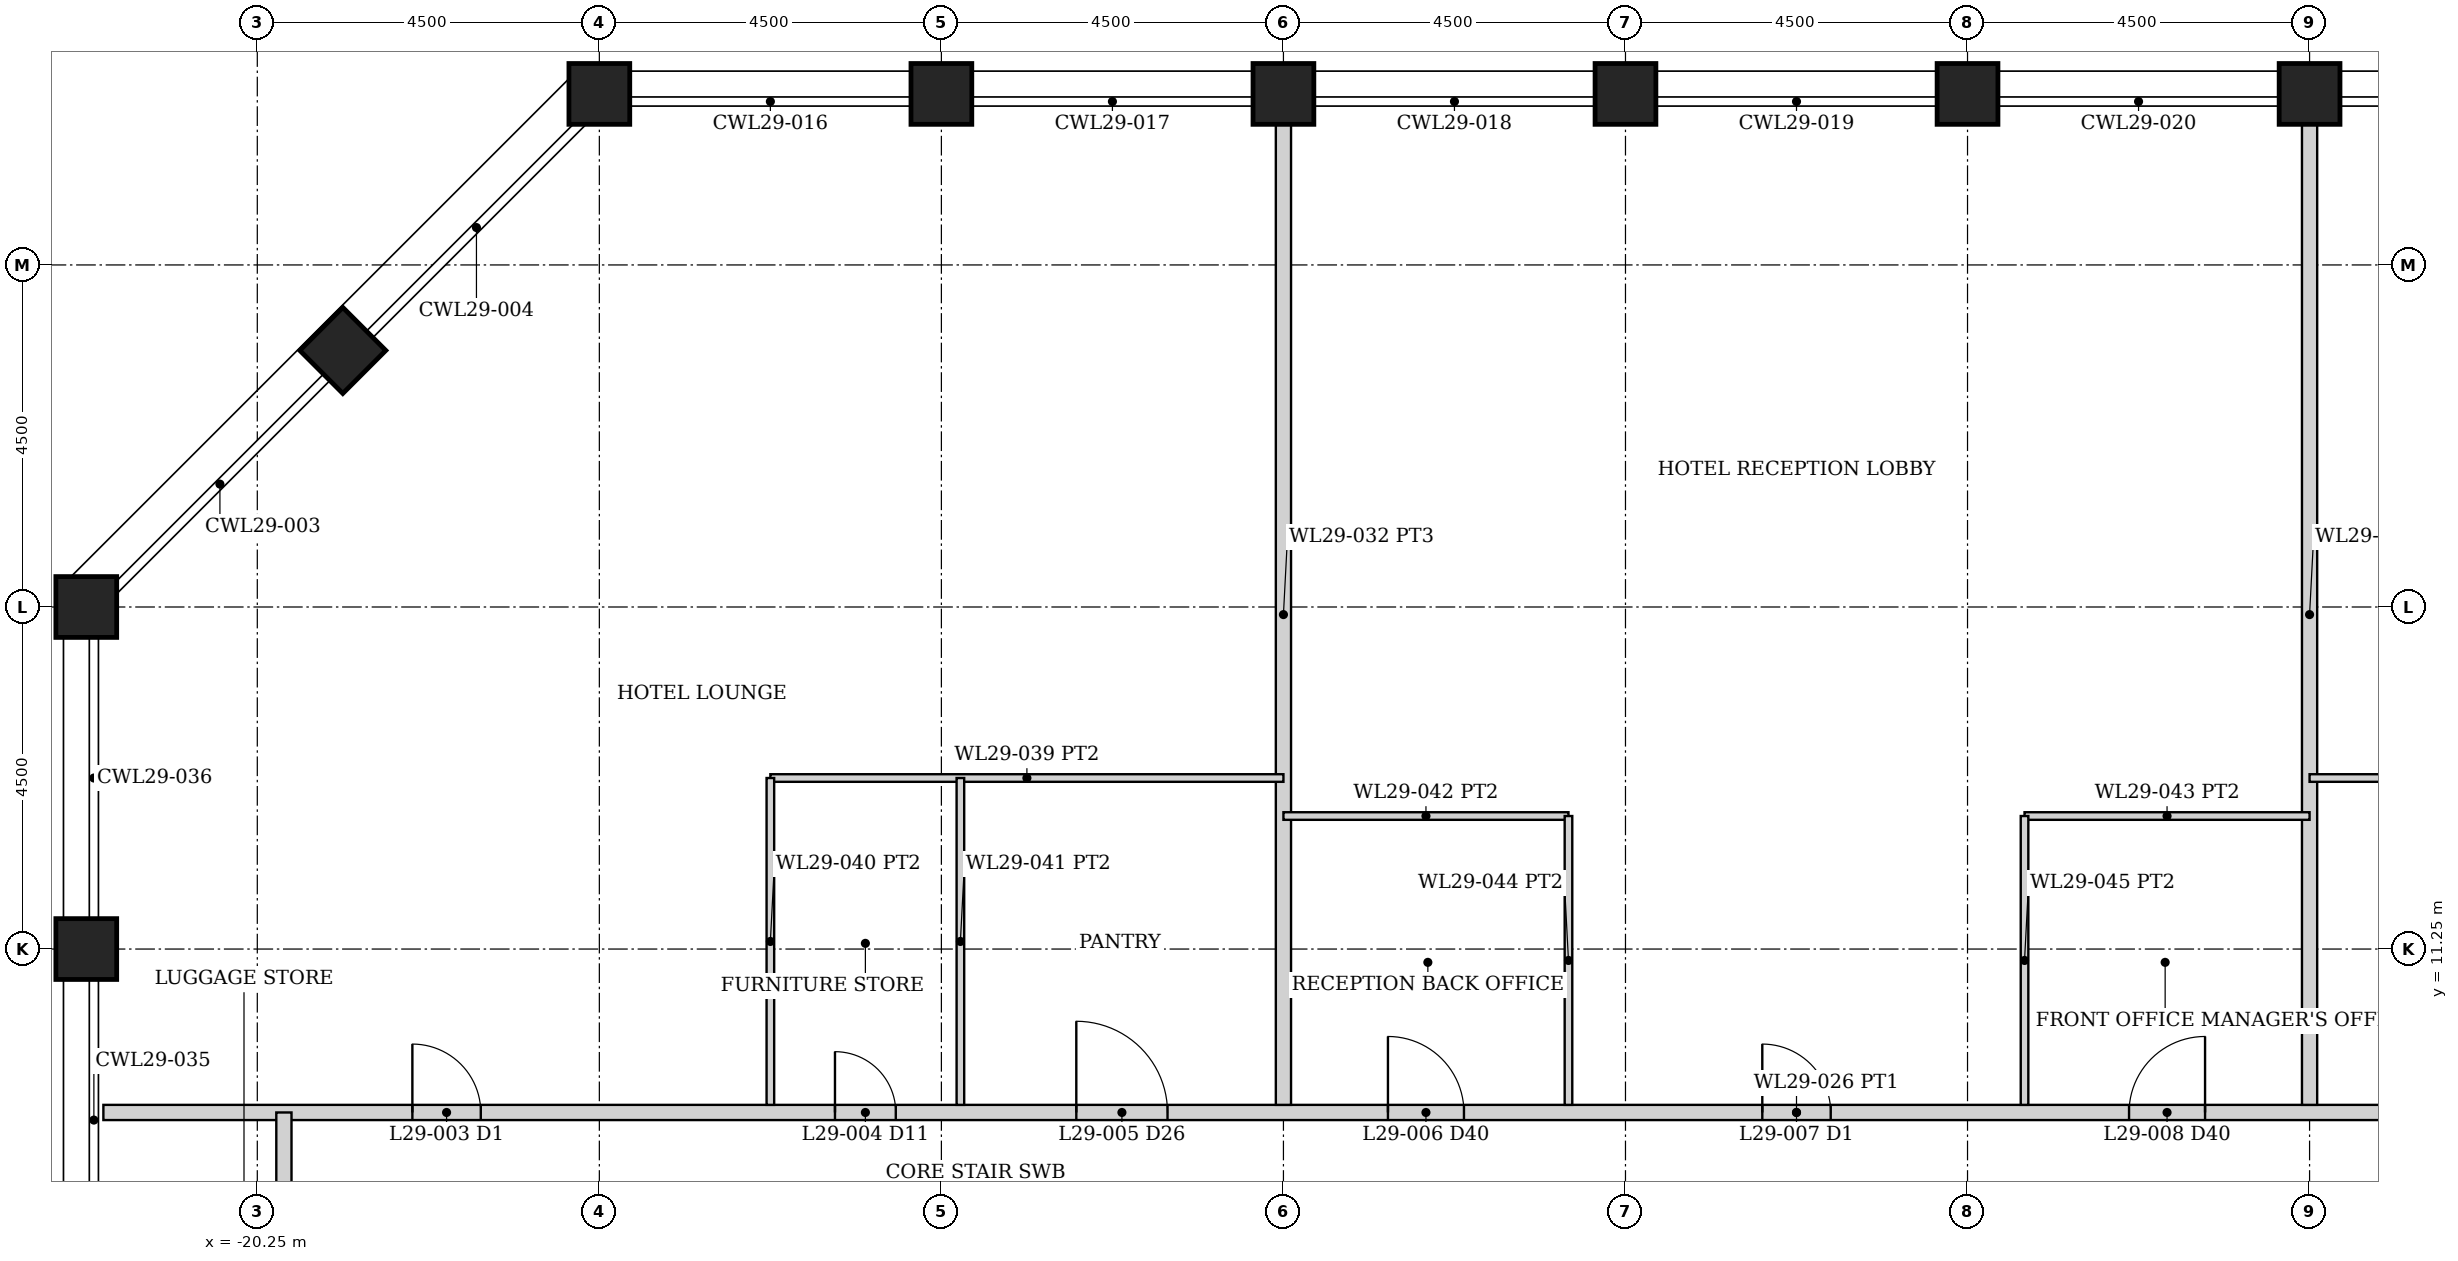
"""IFC4 building model, lengths in metres.
Left out: names, types, materials, properties, quantities, classifications, styles, units other than length and angle.
Written with IfcOpenShell. Run it as: python <this file> out.ifc"""

import sys

from ifc_helpers import new_model, si_unit, direction, frame, frame_2d, origin, origin_2d, place, context, subcontext, project, spatial, rectangle, hollow_rectangle, extrude, element, fill, save


model = new_model("IFC4")
c1 = context("Model", 3, precision=1e-05, world=origin(), true_north=direction((0.0, 1.0)))
c2 = subcontext(c1, "Body", "Model", "MODEL_VIEW")
j1 = project(units=[si_unit("LENGTHUNIT", "METRE"), si_unit("PLANEANGLEUNIT", "RADIAN")], contexts=[c1])
p1 = place(None, origin())
s1 = spatial("IfcSite", under=j1, at=p1, CompositionType="ELEMENT")
p2 = place(p1, origin())
s2 = spatial("IfcBuilding", under=s1, at=p2, CompositionType="ELEMENT")
p3 = place(p2, frame((0.0, 0.0, 112.4)))
s3 = spatial("IfcBuildingStorey", under=s2, at=p3, CompositionType="ELEMENT", Elevation=112.4)
for number, where, z_axis, x_axis in (
    (1, (-15.75, 22.5, 0.0), (0.0, 0.0, 1.0), (0.0, 1.0, 0.0)),
    (2, (-11.25, 22.5, 0.0), (0.0, 0.0, 1.0), (0.0, 1.0, 0.0)),
    (3, (-6.75, 22.5, 0.0), (0.0, 0.0, 1.0), (0.0, 1.0, 0.0)),
    (4, (-2.25, 22.5, 0.0), (0.0, 0.0, 1.0), (0.0, 1.0, 0.0)),
    (5, (2.25, 22.5, 0.0), (0.0, 0.0, 1.0), (0.0, 1.0, 0.0)),
    (6, (6.75, 22.5, 0.0), (0.0, 0.0, 1.0), (0.0, 1.0, 0.0)),
    (7, (-22.5, 11.25, 0.0), (0.0, 0.0, 1.0), (1.0, 0.0, 0.0)),
    (8, (-22.5, 15.75, 0.0), (0.0, 0.0, 1.0), (1.0, 0.0, 0.0)),
    (9, (-19.125, 19.125, 0.0), (0.0, 0.0, 1.0), (0.707, -0.707, 0.0)),
):
    element("IfcColumn", number, at=place(p3, frame(where, z_axis=z_axis, x_axis=x_axis)), inside=s3, PredefinedType="COLUMN", context=c2, shape_type="SweptSolid", body=[
        extrude(hollow_rectangle(XDim=0.8, YDim=0.8, WallThickness=0.06, at=origin_2d()), origin(), (0.0, 0.0, 1.0), 6.0),
    ])
p4 = place(p3, frame((-22.275, 9.1, 0.0), z_axis=(0.0, 0.0, 1.0), x_axis=(1.0, 0.0, 0.0)))
e10 = element("IfcWall", 10, at=p4, inside=s3, PredefinedType="PARTITIONING", context=c2, shape_type="SweptSolid", body=[
    extrude(rectangle(XDim=44.55, YDim=0.2, at=frame_2d((22.275, 0.0))), origin(), (0.0, 0.0, 1.0), 4.874),
])
p5 = place(p4, frame((4.065, 0.0, 0.0)))
e11 = element("IfcOpeningElement", 11, at=p5, cuts=e10, PredefinedType="OPENING", context=c2, shape_type="SweptSolid", body=[
    extrude(rectangle(XDim=0.9, YDim=2.1, at=frame_2d((0.45, 1.05))), frame((0.0, 0.11, 0.0), z_axis=(0.0, -1.0, 0.0), x_axis=(1.0, 0.0, 0.0)), (0.0, 0.0, 1.0), 0.22),
])
p6 = place(p4, frame((9.625, 0.0, 0.0)))
e12 = element("IfcOpeningElement", 12, at=p6, cuts=e10, PredefinedType="OPENING", context=c2, shape_type="SweptSolid", body=[
    extrude(rectangle(XDim=0.8, YDim=2.1, at=frame_2d((0.4, 1.05))), frame((0.0, 0.11, 0.0), z_axis=(0.0, -1.0, 0.0), x_axis=(1.0, 0.0, 0.0)), (0.0, 0.0, 1.0), 0.22),
])
p7 = place(p4, frame((12.8, 0.0, 0.0)))
e13 = element("IfcOpeningElement", 13, at=p7, cuts=e10, PredefinedType="OPENING", context=c2, shape_type="SweptSolid", body=[
    extrude(rectangle(XDim=1.2, YDim=2.1, at=frame_2d((0.6, 1.05))), frame((0.0, 0.11, 0.0), z_axis=(0.0, -1.0, 0.0), x_axis=(1.0, 0.0, 0.0)), (0.0, 0.0, 1.0), 0.22),
])
p8 = place(p4, frame((21.825, 0.0, 0.0)))
e14 = element("IfcOpeningElement", 14, at=p8, cuts=e10, PredefinedType="OPENING", context=c2, shape_type="SweptSolid", body=[
    extrude(rectangle(XDim=0.9, YDim=2.1, at=frame_2d((0.45, 1.05))), frame((0.0, 0.11, 0.0), z_axis=(0.0, -1.0, 0.0), x_axis=(1.0, 0.0, 0.0)), (0.0, 0.0, 1.0), 0.22),
])
p9 = place(p4, frame((16.9, 0.0, 0.0)))
e15 = element("IfcOpeningElement", 15, at=p9, cuts=e10, PredefinedType="OPENING", context=c2, shape_type="SweptSolid", body=[
    extrude(rectangle(XDim=1.0, YDim=2.1, at=frame_2d((0.5, 1.05))), frame((0.0, 0.11, 0.0), z_axis=(0.0, -1.0, 0.0), x_axis=(1.0, 0.0, 0.0)), (0.0, 0.0, 1.0), 0.22),
])
p10 = place(p4, frame((26.65, 0.0, 0.0)))
e16 = element("IfcOpeningElement", 16, at=p10, cuts=e10, PredefinedType="OPENING", context=c2, shape_type="SweptSolid", body=[
    extrude(rectangle(XDim=1.0, YDim=2.1, at=frame_2d((0.5, 1.05))), frame((0.0, 0.11, 0.0), z_axis=(0.0, -1.0, 0.0), x_axis=(1.0, 0.0, 0.0)), (0.0, 0.0, 1.0), 0.22),
])
p11 = place(p4, frame((40.436, 0.0, 0.0)))
e17 = element("IfcOpeningElement", 17, at=p11, cuts=e10, PredefinedType="OPENING", context=c2, shape_type="SweptSolid", body=[
    extrude(rectangle(XDim=0.9, YDim=2.1, at=frame_2d((0.45, 1.05))), frame((0.0, 0.11, 0.0), z_axis=(0.0, -1.0, 0.0), x_axis=(1.0, 0.0, 0.0)), (0.0, 0.0, 1.0), 0.22),
])
p12 = place(p4, frame((32.15, 0.0, 0.0)))
e18 = element("IfcOpeningElement", 18, at=p12, cuts=e10, PredefinedType="OPENING", context=c2, shape_type="SweptSolid", body=[
    extrude(rectangle(XDim=1.5, YDim=2.1, at=frame_2d((0.75, 1.05))), frame((0.0, 0.11, 0.0), z_axis=(0.0, -1.0, 0.0), x_axis=(1.0, 0.0, 0.0)), (0.0, 0.0, 1.0), 0.22),
])
p13 = place(p4, frame((37.775, 0.0, 0.0)))
e19 = element("IfcOpeningElement", 19, at=p13, cuts=e10, PredefinedType="OPENING", context=c2, shape_type="SweptSolid", body=[
    extrude(rectangle(XDim=1.0, YDim=2.1, at=frame_2d((0.5, 1.05))), frame((0.0, 0.11, 0.0), z_axis=(0.0, -1.0, 0.0), x_axis=(1.0, 0.0, 0.0)), (0.0, 0.0, 1.0), 0.22),
])
p14 = place(p3, frame((-19.9, -9.1, 0.0), z_axis=(0.0, 0.0, 1.0), x_axis=(0.0, 1.0, 0.0)))
e20 = element("IfcWall", 20, at=p14, inside=s3, PredefinedType="PARTITIONING", context=c2, shape_type="SweptSolid", body=[
    extrude(rectangle(XDim=18.2, YDim=0.2, at=frame_2d((9.1, 0.0))), origin(), (0.0, 0.0, 1.0), 4.874),
])
p15 = place(p14, frame((13.95, 0.0, 0.0)))
e21 = element("IfcOpeningElement", 21, at=p15, cuts=e20, PredefinedType="OPENING", context=c2, shape_type="SweptSolid", body=[
    extrude(rectangle(XDim=1.5, YDim=2.4, at=frame_2d((0.75, 1.2))), frame((0.0, 0.11, 0.0), z_axis=(0.0, -1.0, 0.0), x_axis=(1.0, 0.0, 0.0)), (0.0, 0.0, 1.0), 0.22),
])
p16 = place(p14, frame((5.25, 0.0, 0.0)))
e22 = element("IfcOpeningElement", 22, at=p16, cuts=e20, PredefinedType="OPENING", context=c2, shape_type="SweptSolid", body=[
    extrude(rectangle(XDim=0.9, YDim=2.1, at=frame_2d((0.45, 1.05))), frame((0.0, 0.11, 0.0), z_axis=(0.0, -1.0, 0.0), x_axis=(1.0, 0.0, 0.0)), (0.0, 0.0, 1.0), 0.22),
])
for number, where, z_axis, x_axis in (
    (23, (-6.75, 9.2, 0.0), (0.0, 0.0, 1.0), (0.0, 1.0, 0.0)),
    (24, (6.75, 9.2, 0.0), (0.0, 0.0, 1.0), (0.0, 1.0, 0.0)),
):
    element("IfcWall", number, at=place(p3, frame(where, z_axis=z_axis, x_axis=x_axis)), inside=s3, PredefinedType="PARTITIONING", context=c2, shape_type="SweptSolid", body=[
        extrude(rectangle(XDim=12.9, YDim=0.2, at=frame_2d((6.45, 0.0))), origin(), (0.0, 0.0, 1.0), 4.874),
    ])
p17 = place(p3, frame((-13.5, 13.5, 0.0), z_axis=(0.0, 0.0, 1.0), x_axis=(1.0, 0.0, 0.0)))
e25 = element("IfcWall", 25, at=p17, inside=s3, PredefinedType="PARTITIONING", context=c2, shape_type="SweptSolid", body=[
    extrude(rectangle(XDim=6.75, YDim=0.1, at=frame_2d((3.375, 0.0))), origin(), (0.0, 0.0, 1.0), 4.874),
])
for number, where, z_axis, x_axis in (
    (26, (-13.5, 9.2, 0.0), (0.0, 0.0, 1.0), (0.0, 1.0, 0.0)),
    (27, (-11.0, 9.2, 0.0), (0.0, 0.0, 1.0), (0.0, 1.0, 0.0)),
):
    element("IfcWall", number, at=place(p3, frame(where, z_axis=z_axis, x_axis=x_axis)), inside=s3, PredefinedType="PARTITIONING", context=c2, shape_type="SweptSolid", body=[
        extrude(rectangle(XDim=4.3, YDim=0.1, at=frame_2d((2.15, 0.0))), origin(), (0.0, 0.0, 1.0), 4.874),
    ])
for number, where, z_axis, x_axis in (
    (28, (-6.75, 13.0, 0.0), (0.0, 0.0, 1.0), (1.0, 0.0, 0.0)),
    (29, (3.0, 13.0, 0.0), (0.0, 0.0, 1.0), (1.0, 0.0, 0.0)),
):
    element("IfcWall", number, at=place(p3, frame(where, z_axis=z_axis, x_axis=x_axis)), inside=s3, PredefinedType="PARTITIONING", context=c2, shape_type="SweptSolid", body=[
        extrude(rectangle(XDim=3.75, YDim=0.1, at=frame_2d((1.875, 0.0))), origin(), (0.0, 0.0, 1.0), 4.874),
    ])
for number, where, z_axis, x_axis in (
    (30, (-3.0, 9.2, 0.0), (0.0, 0.0, 1.0), (0.0, 1.0, 0.0)),
    (31, (3.0, 9.2, 0.0), (0.0, 0.0, 1.0), (0.0, 1.0, 0.0)),
):
    element("IfcWall", number, at=place(p3, frame(where, z_axis=z_axis, x_axis=x_axis)), inside=s3, PredefinedType="PARTITIONING", context=c2, shape_type="SweptSolid", body=[
        extrude(rectangle(XDim=3.8, YDim=0.1, at=frame_2d((1.9, 0.0))), origin(), (0.0, 0.0, 1.0), 4.874),
    ])
p18 = place(p3, frame((6.75, 13.5, 0.0), z_axis=(0.0, 0.0, 1.0), x_axis=(1.0, 0.0, 0.0)))
e32 = element("IfcWall", 32, at=p18, inside=s3, PredefinedType="PARTITIONING", context=c2, shape_type="SweptSolid", body=[
    extrude(rectangle(XDim=10.75, YDim=0.1, at=frame_2d((5.375, 0.0))), origin(), (0.0, 0.0, 1.0), 4.874),
])
p19 = place(p18, frame((3.125, 0.0, 0.0)))
e33 = element("IfcOpeningElement", 33, at=p19, cuts=e32, PredefinedType="OPENING", context=c2, shape_type="SweptSolid", body=[
    extrude(rectangle(XDim=1.5, YDim=2.1, at=frame_2d((0.75, 1.05))), frame((0.0, 0.06, 0.0), z_axis=(0.0, -1.0, 0.0), x_axis=(1.0, 0.0, 0.0)), (0.0, 0.0, 1.0), 0.12),
])
p20 = place(p5, origin())
e34 = element("IfcDoor", 34, at=p20, inside=s3, OperationType="SINGLE_SWING_LEFT", PredefinedType="DOOR", context=c2, shape_type="SweptSolid", body=[
    extrude(rectangle(XDim=0.9, YDim=2.1, at=frame_2d((0.45, 1.05))), frame((0.0, 0.025, 0.0), z_axis=(0.0, -1.0, 0.0), x_axis=(1.0, 0.0, 0.0)), (0.0, 0.0, 1.0), 0.05),
])
fill(e11, e34)
p21 = place(p6, origin())
e35 = element("IfcDoor", 35, at=p21, inside=s3, OperationType="SINGLE_SWING_LEFT", PredefinedType="DOOR", context=c2, shape_type="SweptSolid", body=[
    extrude(rectangle(XDim=0.8, YDim=2.1, at=frame_2d((0.4, 1.05))), frame((0.0, 0.025, 0.0), z_axis=(0.0, -1.0, 0.0), x_axis=(1.0, 0.0, 0.0)), (0.0, 0.0, 1.0), 0.05),
])
fill(e12, e35)
p22 = place(p7, origin())
e36 = element("IfcDoor", 36, at=p22, inside=s3, OperationType="SINGLE_SWING_LEFT", PredefinedType="DOOR", context=c2, shape_type="SweptSolid", body=[
    extrude(rectangle(XDim=1.2, YDim=2.1, at=frame_2d((0.6, 1.05))), frame((0.0, 0.025, 0.0), z_axis=(0.0, -1.0, 0.0), x_axis=(1.0, 0.0, 0.0)), (0.0, 0.0, 1.0), 0.05),
])
fill(e13, e36)
p23 = place(p8, origin())
e37 = element("IfcDoor", 37, at=p23, inside=s3, OperationType="SINGLE_SWING_LEFT", PredefinedType="DOOR", context=c2, shape_type="SweptSolid", body=[
    extrude(rectangle(XDim=0.9, YDim=2.1, at=frame_2d((0.45, 1.05))), frame((0.0, 0.025, 0.0), z_axis=(0.0, -1.0, 0.0), x_axis=(1.0, 0.0, 0.0)), (0.0, 0.0, 1.0), 0.05),
])
fill(e14, e37)
p24 = place(p9, origin())
e38 = element("IfcDoor", 38, at=p24, inside=s3, OperationType="SINGLE_SWING_LEFT", PredefinedType="DOOR", context=c2, shape_type="SweptSolid", body=[
    extrude(rectangle(XDim=1.0, YDim=2.1, at=frame_2d((0.5, 1.05))), frame((0.0, 0.025, 0.0), z_axis=(0.0, -1.0, 0.0), x_axis=(1.0, 0.0, 0.0)), (0.0, 0.0, 1.0), 0.05),
])
fill(e15, e38)
p25 = place(p10, origin())
e39 = element("IfcDoor", 39, at=p25, inside=s3, OperationType="SINGLE_SWING_RIGHT", PredefinedType="DOOR", context=c2, shape_type="SweptSolid", body=[
    extrude(rectangle(XDim=1.0, YDim=2.1, at=frame_2d((0.5, 1.05))), frame((0.0, 0.025, 0.0), z_axis=(0.0, -1.0, 0.0), x_axis=(1.0, 0.0, 0.0)), (0.0, 0.0, 1.0), 0.05),
])
fill(e16, e39)
save(model, sys.argv[1])
